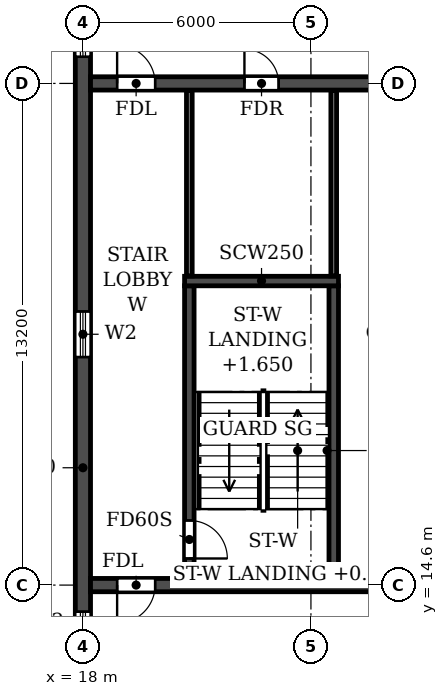
"""IFC4 building model, lengths in metres.
Left out: names, types, materials, properties, quantities, classifications, styles, units other than length and angle.
Written with IfcOpenShell. Run it as: python <this file> out.ifc"""

import sys

from ifc_helpers import new_model, si_unit, direction, frame, frame_2d, origin, place, context, subcontext, project, spatial, rectangle, extrude, element, fill, save


model = new_model("IFC4")
c1 = context("Model", 3, precision=1e-05, world=origin(), true_north=direction((0.0, 1.0)))
c2 = subcontext(c1, "Body", "Model", "MODEL_VIEW")
j1 = project(units=[si_unit("LENGTHUNIT", "METRE"), si_unit("PLANEANGLEUNIT", "RADIAN")], contexts=[c1])
p1 = place(None, origin())
s1 = spatial("IfcSite", under=j1, at=p1, CompositionType="ELEMENT")
p2 = place(p1, origin())
s2 = spatial("IfcBuilding", under=s1, at=p2, CompositionType="ELEMENT")
p3 = place(p2, frame((0.0, 0.0, 221.4)))
s3 = spatial("IfcBuildingStorey", under=s2, at=p3, CompositionType="ELEMENT", Elevation=221.4)
p4 = place(p3, frame((18.0, 4.683, 0.0), z_axis=(0.0, 0.0, 1.0), x_axis=(0.0, 1.0, 0.0)))
e1 = element("IfcWall", 1, at=p4, inside=s3, PredefinedType="SHEAR", context=c2, shape_type="SweptSolid", body=[
    extrude(rectangle(XDim=31.834, YDim=0.4, at=frame_2d((15.917, 0.0))), origin(), (0.0, 0.0, 1.0), 3.08),
])
p5 = place(p4, frame((23.817, 0.0, 0.9)))
e2 = element("IfcOpeningElement", 2, at=p5, cuts=e1, PredefinedType="OPENING", context=c2, shape_type="SweptSolid", body=[
    extrude(rectangle(XDim=1.2, YDim=1.5, at=frame_2d((0.6, 0.75))), frame((0.0, 0.21, 0.0), z_axis=(0.0, -1.0, 0.0), x_axis=(1.0, 0.0, 0.0)), (0.0, 0.0, 1.0), 0.42),
])
p6 = place(p4, frame((8.017, 0.0, 0.9)))
e3 = element("IfcOpeningElement", 3, at=p6, cuts=e1, PredefinedType="OPENING", context=c2, shape_type="SweptSolid", body=[
    extrude(rectangle(XDim=1.2, YDim=1.5, at=frame_2d((0.6, 0.75))), frame((0.0, 0.21, 0.0), z_axis=(0.0, -1.0, 0.0), x_axis=(1.0, 0.0, 0.0)), (0.0, 0.0, 1.0), 0.42),
])
p7 = place(p4, frame((27.694, 0.0, 0.6)))
e4 = element("IfcOpeningElement", 4, at=p7, cuts=e1, PredefinedType="OPENING", context=c2, shape_type="SweptSolid", body=[
    extrude(rectangle(XDim=2.2, YDim=1.8, at=frame_2d((1.1, 0.9))), frame((0.0, 0.21, 0.0), z_axis=(0.0, -1.0, 0.0), x_axis=(1.0, 0.0, 0.0)), (0.0, 0.0, 1.0), 0.42),
])
p8 = place(p4, frame((2.541, 0.0, 0.6)))
e5 = element("IfcOpeningElement", 5, at=p8, cuts=e1, PredefinedType="OPENING", context=c2, shape_type="SweptSolid", body=[
    extrude(rectangle(XDim=2.2, YDim=1.8, at=frame_2d((1.1, 0.9))), frame((0.0, 0.21, 0.0), z_axis=(0.0, -1.0, 0.0), x_axis=(1.0, 0.0, 0.0)), (0.0, 0.0, 1.0), 0.42),
])
p9 = place(p4, frame((15.917, 0.0, 0.9)))
e6 = element("IfcOpeningElement", 6, at=p9, cuts=e1, PredefinedType="OPENING", context=c2, shape_type="SweptSolid", body=[
    extrude(rectangle(XDim=1.2, YDim=1.5, at=frame_2d((0.6, 0.75))), frame((0.0, 0.21, 0.0), z_axis=(0.0, -1.0, 0.0), x_axis=(1.0, 0.0, 0.0)), (0.0, 0.0, 1.0), 0.42),
])
p10 = place(p3, frame((18.2, 14.6, 0.0), z_axis=(0.0, 0.0, 1.0), x_axis=(1.0, 0.0, 0.0)))
e7 = element("IfcWall", 7, at=p10, inside=s3, PredefinedType="SOLIDWALL", context=c2, shape_type="SweptSolid", body=[
    extrude(rectangle(XDim=65.6, YDim=0.35, at=frame_2d((32.8, 0.0))), origin(), (0.0, 0.0, 1.0), 3.08),
])
p11 = place(p10, frame((0.7, 0.0, 0.0)))
e8 = element("IfcOpeningElement", 8, at=p11, cuts=e7, PredefinedType="OPENING", context=c2, shape_type="SweptSolid", body=[
    extrude(rectangle(XDim=1.0, YDim=2.1, at=frame_2d((0.5, 1.05))), frame((0.0, 0.185, 0.0), z_axis=(0.0, -1.0, 0.0), x_axis=(1.0, 0.0, 0.0)), (0.0, 0.0, 1.0), 0.37),
])
p12 = place(p10, frame((8.6, 0.0, 0.0)))
e9 = element("IfcOpeningElement", 9, at=p12, cuts=e7, PredefinedType="OPENING", context=c2, shape_type="SweptSolid", body=[
    extrude(rectangle(XDim=1.0, YDim=2.1, at=frame_2d((0.5, 1.05))), frame((0.0, 0.185, 0.0), z_axis=(0.0, -1.0, 0.0), x_axis=(1.0, 0.0, 0.0)), (0.0, 0.0, 1.0), 0.37),
])
p13 = place(p10, frame((13.2, 0.0, 0.0)))
e10 = element("IfcOpeningElement", 10, at=p13, cuts=e7, PredefinedType="OPENING", context=c2, shape_type="SweptSolid", body=[
    extrude(rectangle(XDim=1.0, YDim=2.1, at=frame_2d((0.5, 1.05))), frame((0.0, 0.185, 0.0), z_axis=(0.0, -1.0, 0.0), x_axis=(1.0, 0.0, 0.0)), (0.0, 0.0, 1.0), 0.37),
])
p14 = place(p10, frame((27.1, 0.0, 0.0)))
e11 = element("IfcOpeningElement", 11, at=p14, cuts=e7, PredefinedType="OPENING", context=c2, shape_type="SweptSolid", body=[
    extrude(rectangle(XDim=1.0, YDim=2.1, at=frame_2d((0.5, 1.05))), frame((0.0, 0.185, 0.0), z_axis=(0.0, -1.0, 0.0), x_axis=(1.0, 0.0, 0.0)), (0.0, 0.0, 1.0), 0.37),
])
p15 = place(p10, frame((32.3, 0.0, 0.0)))
e12 = element("IfcOpeningElement", 12, at=p15, cuts=e7, PredefinedType="OPENING", context=c2, shape_type="SweptSolid", body=[
    extrude(rectangle(XDim=1.0, YDim=2.1, at=frame_2d((0.5, 1.05))), frame((0.0, 0.185, 0.0), z_axis=(0.0, -1.0, 0.0), x_axis=(1.0, 0.0, 0.0)), (0.0, 0.0, 1.0), 0.37),
])
p16 = place(p10, frame((35.95, 0.0, 0.0)))
e13 = element("IfcOpeningElement", 13, at=p16, cuts=e7, PredefinedType="OPENING", context=c2, shape_type="SweptSolid", body=[
    extrude(rectangle(XDim=1.5, YDim=2.1, at=frame_2d((0.75, 1.05))), frame((0.0, 0.185, 0.0), z_axis=(0.0, -1.0, 0.0), x_axis=(1.0, 0.0, 0.0)), (0.0, 0.0, 1.0), 0.37),
])
p17 = place(p10, frame((40.1, 0.0, 0.0)))
e14 = element("IfcOpeningElement", 14, at=p17, cuts=e7, PredefinedType="OPENING", context=c2, shape_type="SweptSolid", body=[
    extrude(rectangle(XDim=1.0, YDim=2.1, at=frame_2d((0.5, 1.05))), frame((0.0, 0.185, 0.0), z_axis=(0.0, -1.0, 0.0), x_axis=(1.0, 0.0, 0.0)), (0.0, 0.0, 1.0), 0.37),
])
p18 = place(p10, frame((51.4, 0.0, 0.0)))
e15 = element("IfcOpeningElement", 15, at=p18, cuts=e7, PredefinedType="OPENING", context=c2, shape_type="SweptSolid", body=[
    extrude(rectangle(XDim=1.0, YDim=2.1, at=frame_2d((0.5, 1.05))), frame((0.0, 0.185, 0.0), z_axis=(0.0, -1.0, 0.0), x_axis=(1.0, 0.0, 0.0)), (0.0, 0.0, 1.0), 0.37),
])
p19 = place(p10, frame((56.0, 0.0, 0.0)))
e16 = element("IfcOpeningElement", 16, at=p19, cuts=e7, PredefinedType="OPENING", context=c2, shape_type="SweptSolid", body=[
    extrude(rectangle(XDim=1.0, YDim=2.1, at=frame_2d((0.5, 1.05))), frame((0.0, 0.185, 0.0), z_axis=(0.0, -1.0, 0.0), x_axis=(1.0, 0.0, 0.0)), (0.0, 0.0, 1.0), 0.37),
])
p20 = place(p10, frame((63.9, 0.0, 0.0)))
e17 = element("IfcOpeningElement", 17, at=p20, cuts=e7, PredefinedType="OPENING", context=c2, shape_type="SweptSolid", body=[
    extrude(rectangle(XDim=1.0, YDim=2.1, at=frame_2d((0.5, 1.05))), frame((0.0, 0.185, 0.0), z_axis=(0.0, -1.0, 0.0), x_axis=(1.0, 0.0, 0.0)), (0.0, 0.0, 1.0), 0.37),
])
p21 = place(p3, frame((18.2, 27.8, 0.0), z_axis=(0.0, 0.0, 1.0), x_axis=(1.0, 0.0, 0.0)))
e18 = element("IfcWall", 18, at=p21, inside=s3, PredefinedType="SOLIDWALL", context=c2, shape_type="SweptSolid", body=[
    extrude(rectangle(XDim=65.6, YDim=0.35, at=frame_2d((32.8, 0.0))), origin(), (0.0, 0.0, 1.0), 3.08),
])
p22 = place(p21, frame((0.7, 0.0, 0.0)))
e19 = element("IfcOpeningElement", 19, at=p22, cuts=e18, PredefinedType="OPENING", context=c2, shape_type="SweptSolid", body=[
    extrude(rectangle(XDim=1.0, YDim=2.1, at=frame_2d((0.5, 1.05))), frame((0.0, 0.185, 0.0), z_axis=(0.0, -1.0, 0.0), x_axis=(1.0, 0.0, 0.0)), (0.0, 0.0, 1.0), 0.37),
])
p23 = place(p21, frame((4.05, 0.0, 0.0)))
e20 = element("IfcOpeningElement", 20, at=p23, cuts=e18, PredefinedType="OPENING", context=c2, shape_type="SweptSolid", body=[
    extrude(rectangle(XDim=0.9, YDim=2.1, at=frame_2d((0.45, 1.05))), frame((0.0, 0.185, 0.0), z_axis=(0.0, -1.0, 0.0), x_axis=(1.0, 0.0, 0.0)), (0.0, 0.0, 1.0), 0.37),
])
p24 = place(p21, frame((13.25, 0.0, 0.0)))
e21 = element("IfcOpeningElement", 21, at=p24, cuts=e18, PredefinedType="OPENING", context=c2, shape_type="SweptSolid", body=[
    extrude(rectangle(XDim=0.9, YDim=2.1, at=frame_2d((0.45, 1.05))), frame((0.0, 0.185, 0.0), z_axis=(0.0, -1.0, 0.0), x_axis=(1.0, 0.0, 0.0)), (0.0, 0.0, 1.0), 0.37),
])
p25 = place(p21, frame((17.7, 0.0, 0.0)))
e22 = element("IfcOpeningElement", 22, at=p25, cuts=e18, PredefinedType="OPENING", context=c2, shape_type="SweptSolid", body=[
    extrude(rectangle(XDim=1.0, YDim=2.1, at=frame_2d((0.5, 1.05))), frame((0.0, 0.185, 0.0), z_axis=(0.0, -1.0, 0.0), x_axis=(1.0, 0.0, 0.0)), (0.0, 0.0, 1.0), 0.37),
])
p26 = place(p21, frame((22.9, 0.0, 0.0)))
e23 = element("IfcOpeningElement", 23, at=p26, cuts=e18, PredefinedType="OPENING", context=c2, shape_type="SweptSolid", body=[
    extrude(rectangle(XDim=1.0, YDim=2.1, at=frame_2d((0.5, 1.05))), frame((0.0, 0.185, 0.0), z_axis=(0.0, -1.0, 0.0), x_axis=(1.0, 0.0, 0.0)), (0.0, 0.0, 1.0), 0.37),
])
p27 = place(p21, frame((29.4, 0.0, 0.0)))
e24 = element("IfcOpeningElement", 24, at=p27, cuts=e18, PredefinedType="OPENING", context=c2, shape_type="SweptSolid", body=[
    extrude(rectangle(XDim=1.0, YDim=2.1, at=frame_2d((0.5, 1.05))), frame((0.0, 0.185, 0.0), z_axis=(0.0, -1.0, 0.0), x_axis=(1.0, 0.0, 0.0)), (0.0, 0.0, 1.0), 0.37),
])
p28 = place(p21, frame((32.3, 0.0, 0.0)))
e25 = element("IfcOpeningElement", 25, at=p28, cuts=e18, PredefinedType="OPENING", context=c2, shape_type="SweptSolid", body=[
    extrude(rectangle(XDim=1.0, YDim=2.1, at=frame_2d((0.5, 1.05))), frame((0.0, 0.185, 0.0), z_axis=(0.0, -1.0, 0.0), x_axis=(1.0, 0.0, 0.0)), (0.0, 0.0, 1.0), 0.37),
])
p29 = place(p21, frame((36.25, 0.0, 0.0)))
e26 = element("IfcOpeningElement", 26, at=p29, cuts=e18, PredefinedType="OPENING", context=c2, shape_type="SweptSolid", body=[
    extrude(rectangle(XDim=1.5, YDim=2.1, at=frame_2d((0.75, 1.05))), frame((0.0, 0.185, 0.0), z_axis=(0.0, -1.0, 0.0), x_axis=(1.0, 0.0, 0.0)), (0.0, 0.0, 1.0), 0.37),
])
p30 = place(p21, frame((41.7, 0.0, 0.0)))
e27 = element("IfcOpeningElement", 27, at=p30, cuts=e18, PredefinedType="OPENING", context=c2, shape_type="SweptSolid", body=[
    extrude(rectangle(XDim=1.0, YDim=2.1, at=frame_2d((0.5, 1.05))), frame((0.0, 0.185, 0.0), z_axis=(0.0, -1.0, 0.0), x_axis=(1.0, 0.0, 0.0)), (0.0, 0.0, 1.0), 0.37),
])
p31 = place(p21, frame((46.9, 0.0, 0.0)))
e28 = element("IfcOpeningElement", 28, at=p31, cuts=e18, PredefinedType="OPENING", context=c2, shape_type="SweptSolid", body=[
    extrude(rectangle(XDim=1.0, YDim=2.1, at=frame_2d((0.5, 1.05))), frame((0.0, 0.185, 0.0), z_axis=(0.0, -1.0, 0.0), x_axis=(1.0, 0.0, 0.0)), (0.0, 0.0, 1.0), 0.37),
])
p32 = place(p21, frame((51.45, 0.0, 0.0)))
e29 = element("IfcOpeningElement", 29, at=p32, cuts=e18, PredefinedType="OPENING", context=c2, shape_type="SweptSolid", body=[
    extrude(rectangle(XDim=0.9, YDim=2.1, at=frame_2d((0.45, 1.05))), frame((0.0, 0.185, 0.0), z_axis=(0.0, -1.0, 0.0), x_axis=(1.0, 0.0, 0.0)), (0.0, 0.0, 1.0), 0.37),
])
p33 = place(p21, frame((60.65, 0.0, 0.0)))
e30 = element("IfcOpeningElement", 30, at=p33, cuts=e18, PredefinedType="OPENING", context=c2, shape_type="SweptSolid", body=[
    extrude(rectangle(XDim=0.9, YDim=2.1, at=frame_2d((0.45, 1.05))), frame((0.0, 0.185, 0.0), z_axis=(0.0, -1.0, 0.0), x_axis=(1.0, 0.0, 0.0)), (0.0, 0.0, 1.0), 0.37),
])
p34 = place(p21, frame((63.9, 0.0, 0.0)))
e31 = element("IfcOpeningElement", 31, at=p34, cuts=e18, PredefinedType="OPENING", context=c2, shape_type="SweptSolid", body=[
    extrude(rectangle(XDim=1.0, YDim=2.1, at=frame_2d((0.5, 1.05))), frame((0.0, 0.185, 0.0), z_axis=(0.0, -1.0, 0.0), x_axis=(1.0, 0.0, 0.0)), (0.0, 0.0, 1.0), 0.37),
])
p35 = place(p3, frame((20.8, 14.775, 0.0), z_axis=(0.0, 0.0, 1.0), x_axis=(0.0, 1.0, 0.0)))
e32 = element("IfcWall", 32, at=p35, inside=s3, PredefinedType="SOLIDWALL", context=c2, shape_type="SweptSolid", body=[
    extrude(rectangle(XDim=7.7, YDim=0.25, at=frame_2d((3.85, 0.0))), origin(), (0.0, 0.0, 1.0), 3.08),
])
p36 = place(p35, frame((0.525, 0.0, 0.0)))
e33 = element("IfcOpeningElement", 33, at=p36, cuts=e32, PredefinedType="OPENING", context=c2, shape_type="SweptSolid", body=[
    extrude(rectangle(XDim=1.0, YDim=2.1, at=frame_2d((0.5, 1.05))), frame((0.0, 0.135, 0.0), z_axis=(0.0, -1.0, 0.0), x_axis=(1.0, 0.0, 0.0)), (0.0, 0.0, 1.0), 0.27),
])
p37 = place(p3, frame((24.6, 14.775, 0.0), z_axis=(0.0, 0.0, 1.0), x_axis=(0.0, 1.0, 0.0)))
e34 = element("IfcWall", 34, at=p37, inside=s3, PredefinedType="SOLIDWALL", context=c2, shape_type="SweptSolid", body=[
    extrude(rectangle(XDim=7.7, YDim=0.25, at=frame_2d((3.85, 0.0))), origin(), (0.0, 0.0, 1.0), 3.08),
])
p38 = place(p3, frame((20.675, 22.6, 0.0), z_axis=(0.0, 0.0, 1.0), x_axis=(1.0, 0.0, 0.0)))
e35 = element("IfcWall", 35, at=p38, inside=s3, PredefinedType="SOLIDWALL", context=c2, shape_type="SweptSolid", body=[
    extrude(rectangle(XDim=4.05, YDim=0.25, at=frame_2d((2.025, 0.0))), origin(), (0.0, 0.0, 1.0), 3.08),
])
for number, where, z_axis, x_axis in (
    (36, (20.8, 22.735, 0.0), (0.0, 0.0, 1.0), (0.0, 1.0, 0.0)),
    (37, (24.6, 22.735, 0.0), (0.0, 0.0, 1.0), (0.0, 1.0, 0.0)),
):
    element("IfcWall", number, at=place(p3, frame(where, z_axis=z_axis, x_axis=x_axis)), inside=s3, PredefinedType="PARTITIONING", context=c2, shape_type="SweptSolid", body=[
        extrude(rectangle(XDim=4.88, YDim=0.15, at=frame_2d((2.44, 0.0))), origin(), (0.0, 0.0, 1.0), 3.08),
    ])
p39 = place(p5, origin())
e38 = element("IfcWindow", 38, at=p39, inside=s3, PartitioningType="SINGLE_PANEL", PredefinedType="WINDOW", context=c2, shape_type="SweptSolid", body=[
    extrude(rectangle(XDim=1.2, YDim=1.5, at=frame_2d((0.6, 0.75))), frame((0.0, 0.03, 0.0), z_axis=(0.0, -1.0, 0.0), x_axis=(1.0, 0.0, 0.0)), (0.0, 0.0, 1.0), 0.06),
])
fill(e2, e38)
p40 = place(p6, origin())
e39 = element("IfcWindow", 39, at=p40, inside=s3, PartitioningType="SINGLE_PANEL", PredefinedType="WINDOW", context=c2, shape_type="SweptSolid", body=[
    extrude(rectangle(XDim=1.2, YDim=1.5, at=frame_2d((0.6, 0.75))), frame((0.0, 0.03, 0.0), z_axis=(0.0, -1.0, 0.0), x_axis=(1.0, 0.0, 0.0)), (0.0, 0.0, 1.0), 0.06),
])
fill(e3, e39)
p41 = place(p9, origin())
e40 = element("IfcWindow", 40, at=p41, inside=s3, PartitioningType="SINGLE_PANEL", PredefinedType="WINDOW", context=c2, shape_type="SweptSolid", body=[
    extrude(rectangle(XDim=1.2, YDim=1.5, at=frame_2d((0.6, 0.75))), frame((0.0, 0.03, 0.0), z_axis=(0.0, -1.0, 0.0), x_axis=(1.0, 0.0, 0.0)), (0.0, 0.0, 1.0), 0.06),
])
fill(e6, e40)
p42 = place(p22, origin())
e41 = element("IfcDoor", 41, at=p42, inside=s3, OperationType="SINGLE_SWING_LEFT", PredefinedType="DOOR", context=c2, shape_type="SweptSolid", body=[
    extrude(rectangle(XDim=1.0, YDim=2.1, at=frame_2d((0.5, 1.05))), frame((0.0, 0.025, 0.0), z_axis=(0.0, -1.0, 0.0), x_axis=(1.0, 0.0, 0.0)), (0.0, 0.0, 1.0), 0.05),
])
fill(e19, e41)
p43 = place(p23, origin())
e42 = element("IfcDoor", 42, at=p43, inside=s3, OperationType="SINGLE_SWING_LEFT", PredefinedType="DOOR", context=c2, shape_type="SweptSolid", body=[
    extrude(rectangle(XDim=0.9, YDim=2.1, at=frame_2d((0.45, 1.05))), frame((0.0, 0.025, 0.0), z_axis=(0.0, -1.0, 0.0), x_axis=(1.0, 0.0, 0.0)), (0.0, 0.0, 1.0), 0.05),
])
fill(e20, e42)
p44 = place(p11, frame((1.0, 0.0, 0.0), z_axis=(0.0, 0.0, 1.0), x_axis=(-1.0, 0.0, 0.0)))
e43 = element("IfcDoor", 43, at=p44, inside=s3, OperationType="SINGLE_SWING_RIGHT", PredefinedType="DOOR", context=c2, shape_type="SweptSolid", body=[
    extrude(rectangle(XDim=1.0, YDim=2.1, at=frame_2d((0.5, 1.05))), frame((0.0, 0.025, 0.0), z_axis=(0.0, -1.0, 0.0), x_axis=(1.0, 0.0, 0.0)), (0.0, 0.0, 1.0), 0.05),
])
fill(e8, e43)
p45 = place(p36, frame((1.0, 0.0, 0.0), z_axis=(0.0, 0.0, 1.0), x_axis=(-1.0, 0.0, 0.0)))
e44 = element("IfcDoor", 44, at=p45, inside=s3, OperationType="SINGLE_SWING_RIGHT", PredefinedType="DOOR", context=c2, shape_type="SweptSolid", body=[
    extrude(rectangle(XDim=1.0, YDim=2.1, at=frame_2d((0.5, 1.05))), frame((0.0, 0.025, 0.0), z_axis=(0.0, -1.0, 0.0), x_axis=(1.0, 0.0, 0.0)), (0.0, 0.0, 1.0), 0.05),
])
fill(e33, e44)
save(model, sys.argv[1])
